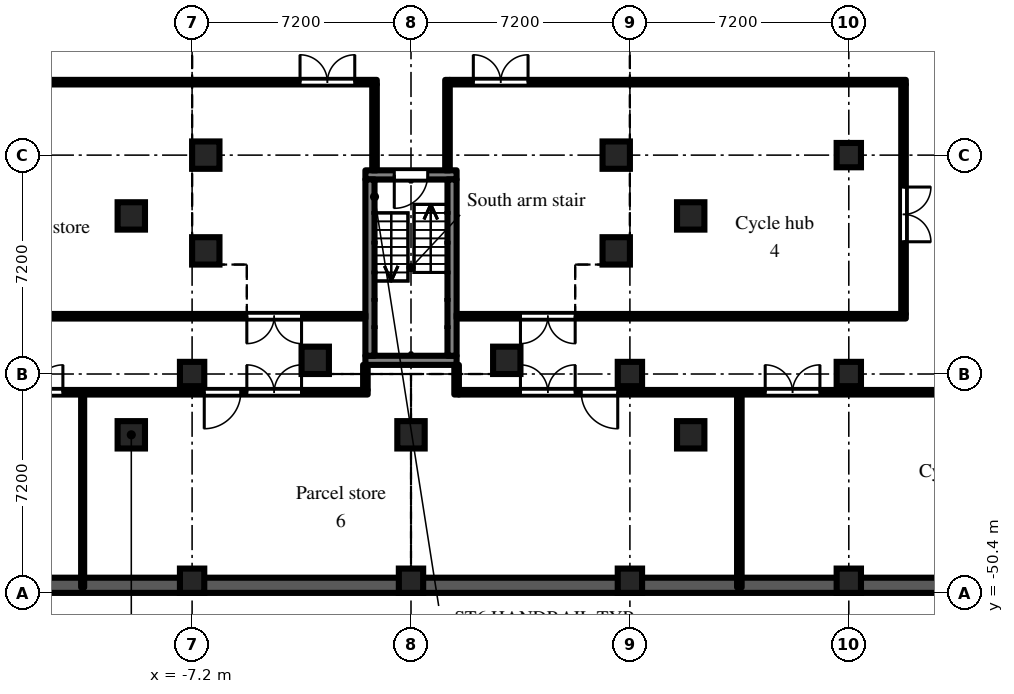
"""IFC4 building model, lengths in metres.
Left out: names, types, materials, properties, quantities, classifications, styles, units other than length and angle.
Written with IfcOpenShell. Run it as: python <this file> out.ifc"""

import sys

from ifc_helpers import new_model, si_unit, direction, frame, frame_2d, origin, origin_2d, place, context, subcontext, project, spatial, rectangle, extrude, element, fill, save


model = new_model("IFC4")
c1 = context("Model", 3, precision=1e-05, world=origin(), true_north=direction((0.0, 1.0)))
c2 = subcontext(c1, "Body", "Model", "MODEL_VIEW")
j1 = project(units=[si_unit("LENGTHUNIT", "METRE"), si_unit("PLANEANGLEUNIT", "RADIAN")], contexts=[c1])
p1 = place(None, origin())
s1 = spatial("IfcSite", under=j1, at=p1, CompositionType="ELEMENT")
p2 = place(p1, origin())
s2 = spatial("IfcBuilding", under=s1, at=p2, CompositionType="ELEMENT")
p3 = place(p2, frame((0.0, 0.0, -4.8)))
s3 = spatial("IfcBuildingStorey", under=s2, at=p3, CompositionType="ELEMENT", Elevation=-4.8)
p4 = place(p3, frame((-50.4, -50.15, -0.5), z_axis=(0.0, 0.0, 1.0), x_axis=(1.0, 0.0, 0.0)))
e1 = element("IfcWall", 1, at=p4, inside=s3, PredefinedType="SOLIDWALL", context=c2, shape_type="SweptSolid", body=[
    extrude(rectangle(XDim=100.8, YDim=0.5, at=frame_2d((50.4, 0.0))), origin(), (0.0, 0.0, 1.0), 5.3),
])
for number, where, z_axis, x_axis in (
    (2, (-6.75, -39.15, -0.5), (0.0, 0.0, 1.0), (1.0, 0.0, 0.0)),
    (3, (-6.75, -36.0, -0.5), (0.0, 0.0, 1.0), (1.0, 0.0, 0.0)),
    (4, (-3.15, -42.75, -0.5), (0.0, 0.0, 1.0), (1.0, 0.0, 0.0)),
    (5, (3.15, -42.75, -0.5), (0.0, 0.0, 1.0), (1.0, 0.0, 0.0)),
    (6, (6.75, -39.15, -0.5), (0.0, 0.0, 1.0), (1.0, 0.0, 0.0)),
    (7, (6.75, -36.0, -0.5), (0.0, 0.0, 1.0), (1.0, 0.0, 0.0)),
):
    element("IfcColumn", number, at=place(p3, frame(where, z_axis=z_axis, x_axis=x_axis)), inside=s3, PredefinedType="COLUMN", context=c2, shape_type="SweptSolid", body=[
        extrude(rectangle(XDim=0.9, YDim=0.9, at=origin_2d()), origin(), (0.0, 0.0, 1.0), 5.3),
    ])
for number, where, z_axis, x_axis in (
    (8, (-7.2, -50.0, -0.5), (0.0, 0.0, 1.0), (1.0, 0.0, 0.0)),
    (9, (-7.2, -43.2, -0.5), (0.0, 0.0, 1.0), (1.0, 0.0, 0.0)),
    (10, (0.0, -50.0, -0.5), (0.0, 0.0, 1.0), (1.0, 0.0, 0.0)),
    (11, (7.2, -50.0, -0.5), (0.0, 0.0, 1.0), (1.0, 0.0, 0.0)),
    (12, (7.2, -43.2, -0.5), (0.0, 0.0, 1.0), (1.0, 0.0, 0.0)),
    (13, (14.4, -50.0, -0.5), (0.0, 0.0, 1.0), (1.0, 0.0, 0.0)),
    (14, (14.4, -43.2, -0.5), (0.0, 0.0, 1.0), (1.0, 0.0, 0.0)),
    (15, (14.4, -36.0, -0.5), (0.0, 0.0, 1.0), (1.0, 0.0, 0.0)),
):
    element("IfcColumn", number, at=place(p3, frame(where, z_axis=z_axis, x_axis=x_axis)), inside=s3, PredefinedType="COLUMN", context=c2, shape_type="SweptSolid", body=[
        extrude(rectangle(XDim=0.8, YDim=0.8, at=origin_2d()), origin(), (0.0, 0.0, 1.0), 5.3),
    ])
for number, where, z_axis, x_axis in (
    (16, (-9.2, -45.2, -0.5), (0.0, 0.0, 1.0), (1.0, 0.0, 0.0)),
    (17, (-9.2, -38.0, -0.5), (0.0, 0.0, 1.0), (1.0, 0.0, 0.0)),
    (18, (0.0, -45.2, -0.5), (0.0, 0.0, 1.0), (1.0, 0.0, 0.0)),
    (19, (9.2, -45.2, -0.5), (0.0, 0.0, 1.0), (1.0, 0.0, 0.0)),
    (20, (9.2, -38.0, -0.5), (0.0, 0.0, 1.0), (1.0, 0.0, 0.0)),
):
    element("IfcColumn", number, at=place(p3, frame(where, z_axis=z_axis, x_axis=x_axis)), inside=s3, PredefinedType="COLUMN", context=c2, shape_type="SweptSolid", body=[
        extrude(rectangle(XDim=0.9, YDim=0.9, at=origin_2d()), origin(), (0.0, 0.0, 1.0), 5.3),
    ])
p5 = place(p3, frame((-1.5, -36.65, 0.0), z_axis=(0.0, 0.0, 1.0), x_axis=(1.0, 0.0, 0.0)))
e21 = element("IfcWall", 21, at=p5, inside=s3, PredefinedType="SHEAR", context=c2, shape_type="SweptSolid", body=[
    extrude(rectangle(XDim=3.0, YDim=0.3, at=frame_2d((1.5, 0.0))), origin(), (0.0, 0.0, 1.0), 4.35),
])
p6 = place(p5, frame((0.95, 0.0, 0.0)))
e22 = element("IfcOpeningElement", 22, at=p6, cuts=e21, PredefinedType="OPENING", context=c2, shape_type="SweptSolid", body=[
    extrude(rectangle(XDim=1.1, YDim=2.1, at=frame_2d((0.55, 1.05))), frame((0.0, 0.16, 0.0), z_axis=(0.0, -1.0, 0.0), x_axis=(1.0, 0.0, 0.0)), (0.0, 0.0, 1.0), 0.32),
])
p7 = place(p3, frame((-1.5, -42.75, 0.0), z_axis=(0.0, 0.0, 1.0), x_axis=(1.0, 0.0, 0.0)))
e23 = element("IfcWall", 23, at=p7, inside=s3, PredefinedType="SHEAR", context=c2, shape_type="SweptSolid", body=[
    extrude(rectangle(XDim=3.0, YDim=0.3, at=frame_2d((1.5, 0.0))), origin(), (0.0, 0.0, 1.0), 4.35),
])
for number, where, z_axis, x_axis in (
    (24, (-1.35, -36.8, 0.0), (0.0, 0.0, 1.0), (0.0, -1.0, 0.0)),
    (25, (1.35, -36.8, 0.0), (0.0, 0.0, 1.0), (0.0, -1.0, 0.0)),
):
    element("IfcWall", number, at=place(p3, frame(where, z_axis=z_axis, x_axis=x_axis)), inside=s3, PredefinedType="SHEAR", context=c2, shape_type="SweptSolid", body=[
        extrude(rectangle(XDim=5.8, YDim=0.3, at=frame_2d((2.9, 0.0))), origin(), (0.0, 0.0, 1.0), 4.35),
    ])
p8 = place(p3, frame((-43.725, -43.8, 0.0), z_axis=(0.0, 0.0, 1.0), x_axis=(1.0, 0.0, 0.0)))
e26 = element("IfcWall", 26, at=p8, inside=s3, PredefinedType="PARTITIONING", context=c2, shape_type="SweptSolid", body=[
    extrude(rectangle(XDim=42.3, YDim=0.15, at=frame_2d((21.15, 0.0))), origin(), (0.0, 0.0, 1.0), 4.35),
])
p9 = place(p8, frame((1.675, 0.0, 0.0)))
e27 = element("IfcOpeningElement", 27, at=p9, cuts=e26, PredefinedType="OPENING", context=c2, shape_type="SweptSolid", body=[
    extrude(rectangle(XDim=1.8, YDim=2.1, at=frame_2d((0.9, 1.05))), frame((0.0, 0.085, 0.0), z_axis=(0.0, -1.0, 0.0), x_axis=(1.0, 0.0, 0.0)), (0.0, 0.0, 1.0), 0.17),
])
p10 = place(p8, frame((4.975, 0.0, 0.0)))
e28 = element("IfcOpeningElement", 28, at=p10, cuts=e26, PredefinedType="OPENING", context=c2, shape_type="SweptSolid", body=[
    extrude(rectangle(XDim=1.8, YDim=2.1, at=frame_2d((0.9, 1.05))), frame((0.0, 0.085, 0.0), z_axis=(0.0, -1.0, 0.0), x_axis=(1.0, 0.0, 0.0)), (0.0, 0.0, 1.0), 0.17),
])
p11 = place(p8, frame((16.075, 0.0, 0.0)))
e29 = element("IfcOpeningElement", 29, at=p11, cuts=e26, PredefinedType="OPENING", context=c2, shape_type="SweptSolid", body=[
    extrude(rectangle(XDim=1.8, YDim=2.1, at=frame_2d((0.9, 1.05))), frame((0.0, 0.085, 0.0), z_axis=(0.0, -1.0, 0.0), x_axis=(1.0, 0.0, 0.0)), (0.0, 0.0, 1.0), 0.17),
])
p12 = place(p8, frame((19.375, 0.0, 0.0)))
e30 = element("IfcOpeningElement", 30, at=p12, cuts=e26, PredefinedType="OPENING", context=c2, shape_type="SweptSolid", body=[
    extrude(rectangle(XDim=1.8, YDim=2.1, at=frame_2d((0.9, 1.05))), frame((0.0, 0.085, 0.0), z_axis=(0.0, -1.0, 0.0), x_axis=(1.0, 0.0, 0.0)), (0.0, 0.0, 1.0), 0.17),
])
p13 = place(p8, frame((30.475, 0.0, 0.0)))
e31 = element("IfcOpeningElement", 31, at=p13, cuts=e26, PredefinedType="OPENING", context=c2, shape_type="SweptSolid", body=[
    extrude(rectangle(XDim=1.8, YDim=2.1, at=frame_2d((0.9, 1.05))), frame((0.0, 0.085, 0.0), z_axis=(0.0, -1.0, 0.0), x_axis=(1.0, 0.0, 0.0)), (0.0, 0.0, 1.0), 0.17),
])
p14 = place(p8, frame((36.925, 0.0, 0.0)))
e32 = element("IfcOpeningElement", 32, at=p14, cuts=e26, PredefinedType="OPENING", context=c2, shape_type="SweptSolid", body=[
    extrude(rectangle(XDim=1.2, YDim=2.1, at=frame_2d((0.6, 1.05))), frame((0.0, 0.085, 0.0), z_axis=(0.0, -1.0, 0.0), x_axis=(1.0, 0.0, 0.0)), (0.0, 0.0, 1.0), 0.17),
])
p15 = place(p8, frame((38.325, 0.0, 0.0)))
e33 = element("IfcOpeningElement", 33, at=p15, cuts=e26, PredefinedType="OPENING", context=c2, shape_type="SweptSolid", body=[
    extrude(rectangle(XDim=1.8, YDim=2.1, at=frame_2d((0.9, 1.05))), frame((0.0, 0.085, 0.0), z_axis=(0.0, -1.0, 0.0), x_axis=(1.0, 0.0, 0.0)), (0.0, 0.0, 1.0), 0.17),
])
p16 = place(p3, frame((-16.125, -41.3, 0.0), z_axis=(0.0, 0.0, 1.0), x_axis=(1.0, 0.0, 0.0)))
e34 = element("IfcWall", 34, at=p16, inside=s3, PredefinedType="PARTITIONING", context=c2, shape_type="SweptSolid", body=[
    extrude(rectangle(XDim=14.625, YDim=0.15, at=frame_2d((7.312, 0.0))), origin(), (0.0, 0.0, 1.0), 4.35),
])
p17 = place(p16, frame((10.725, 0.0, 0.0)))
e35 = element("IfcOpeningElement", 35, at=p17, cuts=e34, PredefinedType="OPENING", context=c2, shape_type="SweptSolid", body=[
    extrude(rectangle(XDim=1.8, YDim=2.1, at=frame_2d((0.9, 1.05))), frame((0.0, 0.085, 0.0), z_axis=(0.0, -1.0, 0.0), x_axis=(1.0, 0.0, 0.0)), (0.0, 0.0, 1.0), 0.17),
])
p18 = place(p3, frame((-16.125, -33.6, 0.0), z_axis=(0.0, 0.0, 1.0), x_axis=(1.0, 0.0, 0.0)))
e36 = element("IfcWall", 36, at=p18, inside=s3, PredefinedType="PARTITIONING", context=c2, shape_type="SweptSolid", body=[
    extrude(rectangle(XDim=15.0, YDim=0.15, at=frame_2d((7.5, 0.0))), origin(), (0.0, 0.0, 1.0), 4.35),
])
p19 = place(p18, frame((12.475, 0.0, 0.0)))
e37 = element("IfcOpeningElement", 37, at=p19, cuts=e36, PredefinedType="OPENING", context=c2, shape_type="SweptSolid", body=[
    extrude(rectangle(XDim=1.8, YDim=2.1, at=frame_2d((0.9, 1.05))), frame((0.0, 0.085, 0.0), z_axis=(0.0, -1.0, 0.0), x_axis=(1.0, 0.0, 0.0)), (0.0, 0.0, 1.0), 0.17),
])
p20 = place(p3, frame((-10.8, -50.22, 0.0), z_axis=(0.0, 0.0, 1.0), x_axis=(0.0, 1.0, 0.0)))
e38 = element("IfcWall", 38, at=p20, inside=s3, PredefinedType="PARTITIONING", context=c2, shape_type="SweptSolid", body=[
    extrude(rectangle(XDim=6.345, YDim=0.1, at=frame_2d((3.172, 0.0))), origin(), (0.0, 0.0, 1.0), 4.35),
])
p21 = place(p3, frame((-1.5, -43.725, 0.0), z_axis=(0.0, 0.0, 1.0), x_axis=(0.0, 1.0, 0.0)))
e39 = element("IfcWall", 39, at=p21, inside=s3, PredefinedType="PARTITIONING", context=c2, shape_type="SweptSolid", body=[
    extrude(rectangle(XDim=0.825, YDim=0.15, at=frame_2d((0.413, 0.0))), origin(), (0.0, 0.0, 1.0), 4.35),
])
p22 = place(p3, frame((-1.2, -36.5, 0.0), z_axis=(0.0, 0.0, 1.0), x_axis=(0.0, 1.0, 0.0)))
e40 = element("IfcWall", 40, at=p22, inside=s3, PredefinedType="PARTITIONING", context=c2, shape_type="SweptSolid", body=[
    extrude(rectangle(XDim=2.825, YDim=0.15, at=frame_2d((1.413, 0.0))), origin(), (0.0, 0.0, 1.0), 4.35),
])
p23 = place(p3, frame((1.2, -36.5, 0.0), z_axis=(0.0, 0.0, 1.0), x_axis=(0.0, 1.0, 0.0)))
e41 = element("IfcWall", 41, at=p23, inside=s3, PredefinedType="PARTITIONING", context=c2, shape_type="SweptSolid", body=[
    extrude(rectangle(XDim=2.975, YDim=0.15, at=frame_2d((1.488, 0.0))), origin(), (0.0, 0.0, 1.0), 4.35),
])
p24 = place(p3, frame((1.275, -33.6, 0.0), z_axis=(0.0, 0.0, 1.0), x_axis=(1.0, 0.0, 0.0)))
e42 = element("IfcWall", 42, at=p24, inside=s3, PredefinedType="PARTITIONING", context=c2, shape_type="SweptSolid", body=[
    extrude(rectangle(XDim=15.0, YDim=0.15, at=frame_2d((7.5, 0.0))), origin(), (0.0, 0.0, 1.0), 4.35),
])
p25 = place(p24, frame((0.775, 0.0, 0.0)))
e43 = element("IfcOpeningElement", 43, at=p25, cuts=e42, PredefinedType="OPENING", context=c2, shape_type="SweptSolid", body=[
    extrude(rectangle(XDim=1.8, YDim=2.1, at=frame_2d((0.9, 1.05))), frame((0.0, 0.085, 0.0), z_axis=(0.0, -1.0, 0.0), x_axis=(1.0, 0.0, 0.0)), (0.0, 0.0, 1.0), 0.17),
])
p26 = place(p3, frame((1.5, -43.875, 0.0), z_axis=(0.0, 0.0, 1.0), x_axis=(0.0, 1.0, 0.0)))
e44 = element("IfcWall", 44, at=p26, inside=s3, PredefinedType="PARTITIONING", context=c2, shape_type="SweptSolid", body=[
    extrude(rectangle(XDim=0.975, YDim=0.15, at=frame_2d((0.488, 0.0))), origin(), (0.0, 0.0, 1.0), 4.35),
])
p27 = place(p3, frame((1.575, -43.8, 0.0), z_axis=(0.0, 0.0, 1.0), x_axis=(1.0, 0.0, 0.0)))
e45 = element("IfcWall", 45, at=p27, inside=s3, PredefinedType="PARTITIONING", context=c2, shape_type="SweptSolid", body=[
    extrude(rectangle(XDim=42.3, YDim=0.15, at=frame_2d((21.15, 0.0))), origin(), (0.0, 0.0, 1.0), 4.35),
])
p28 = place(p27, frame((38.675, 0.0, 0.0)))
e46 = element("IfcOpeningElement", 46, at=p28, cuts=e45, PredefinedType="OPENING", context=c2, shape_type="SweptSolid", body=[
    extrude(rectangle(XDim=1.8, YDim=2.1, at=frame_2d((0.9, 1.05))), frame((0.0, 0.085, 0.0), z_axis=(0.0, -1.0, 0.0), x_axis=(1.0, 0.0, 0.0)), (0.0, 0.0, 1.0), 0.17),
])
p29 = place(p27, frame((2.025, 0.0, 0.0)))
e47 = element("IfcOpeningElement", 47, at=p29, cuts=e45, PredefinedType="OPENING", context=c2, shape_type="SweptSolid", body=[
    extrude(rectangle(XDim=1.8, YDim=2.1, at=frame_2d((0.9, 1.05))), frame((0.0, 0.085, 0.0), z_axis=(0.0, -1.0, 0.0), x_axis=(1.0, 0.0, 0.0)), (0.0, 0.0, 1.0), 0.17),
])
p30 = place(p27, frame((4.025, 0.0, 0.0)))
e48 = element("IfcOpeningElement", 48, at=p30, cuts=e45, PredefinedType="OPENING", context=c2, shape_type="SweptSolid", body=[
    extrude(rectangle(XDim=1.2, YDim=2.1, at=frame_2d((0.6, 1.05))), frame((0.0, 0.085, 0.0), z_axis=(0.0, -1.0, 0.0), x_axis=(1.0, 0.0, 0.0)), (0.0, 0.0, 1.0), 0.17),
])
p31 = place(p27, frame((10.075, 0.0, 0.0)))
e49 = element("IfcOpeningElement", 49, at=p31, cuts=e45, PredefinedType="OPENING", context=c2, shape_type="SweptSolid", body=[
    extrude(rectangle(XDim=1.8, YDim=2.1, at=frame_2d((0.9, 1.05))), frame((0.0, 0.085, 0.0), z_axis=(0.0, -1.0, 0.0), x_axis=(1.0, 0.0, 0.0)), (0.0, 0.0, 1.0), 0.17),
])
p32 = place(p27, frame((21.175, 0.0, 0.0)))
e50 = element("IfcOpeningElement", 50, at=p32, cuts=e45, PredefinedType="OPENING", context=c2, shape_type="SweptSolid", body=[
    extrude(rectangle(XDim=1.8, YDim=2.1, at=frame_2d((0.9, 1.05))), frame((0.0, 0.085, 0.0), z_axis=(0.0, -1.0, 0.0), x_axis=(1.0, 0.0, 0.0)), (0.0, 0.0, 1.0), 0.17),
])
p33 = place(p27, frame((24.475, 0.0, 0.0)))
e51 = element("IfcOpeningElement", 51, at=p33, cuts=e45, PredefinedType="OPENING", context=c2, shape_type="SweptSolid", body=[
    extrude(rectangle(XDim=1.8, YDim=2.1, at=frame_2d((0.9, 1.05))), frame((0.0, 0.085, 0.0), z_axis=(0.0, -1.0, 0.0), x_axis=(1.0, 0.0, 0.0)), (0.0, 0.0, 1.0), 0.17),
])
p34 = place(p27, frame((35.575, 0.0, 0.0)))
e52 = element("IfcOpeningElement", 52, at=p34, cuts=e45, PredefinedType="OPENING", context=c2, shape_type="SweptSolid", body=[
    extrude(rectangle(XDim=1.8, YDim=2.1, at=frame_2d((0.9, 1.05))), frame((0.0, 0.085, 0.0), z_axis=(0.0, -1.0, 0.0), x_axis=(1.0, 0.0, 0.0)), (0.0, 0.0, 1.0), 0.17),
])
p35 = place(p3, frame((1.5, -41.3, 0.0), z_axis=(0.0, 0.0, 1.0), x_axis=(1.0, 0.0, 0.0)))
e53 = element("IfcWall", 53, at=p35, inside=s3, PredefinedType="PARTITIONING", context=c2, shape_type="SweptSolid", body=[
    extrude(rectangle(XDim=14.775, YDim=0.15, at=frame_2d((7.387, 0.0))), origin(), (0.0, 0.0, 1.0), 4.35),
])
p36 = place(p35, frame((2.1, 0.0, 0.0)))
e54 = element("IfcOpeningElement", 54, at=p36, cuts=e53, PredefinedType="OPENING", context=c2, shape_type="SweptSolid", body=[
    extrude(rectangle(XDim=1.8, YDim=2.1, at=frame_2d((0.9, 1.05))), frame((0.0, 0.085, 0.0), z_axis=(0.0, -1.0, 0.0), x_axis=(1.0, 0.0, 0.0)), (0.0, 0.0, 1.0), 0.17),
])
p37 = place(p3, frame((10.8, -50.22, 0.0), z_axis=(0.0, 0.0, 1.0), x_axis=(0.0, 1.0, 0.0)))
e55 = element("IfcWall", 55, at=p37, inside=s3, PredefinedType="PARTITIONING", context=c2, shape_type="SweptSolid", body=[
    extrude(rectangle(XDim=6.345, YDim=0.15, at=frame_2d((3.172, 0.0))), origin(), (0.0, 0.0, 1.0), 4.35),
])
p38 = place(p3, frame((16.2, -41.225, 0.0), z_axis=(0.0, 0.0, 1.0), x_axis=(0.0, 1.0, 0.0)))
e56 = element("IfcWall", 56, at=p38, inside=s3, PredefinedType="PARTITIONING", context=c2, shape_type="SweptSolid", body=[
    extrude(rectangle(XDim=7.55, YDim=0.15, at=frame_2d((3.775, 0.0))), origin(), (0.0, 0.0, 1.0), 4.35),
])
p39 = place(p38, frame((2.375, 0.0, 0.0)))
e57 = element("IfcOpeningElement", 57, at=p39, cuts=e56, PredefinedType="OPENING", context=c2, shape_type="SweptSolid", body=[
    extrude(rectangle(XDim=1.8, YDim=2.1, at=frame_2d((0.9, 1.05))), frame((0.0, 0.085, 0.0), z_axis=(0.0, -1.0, 0.0), x_axis=(1.0, 0.0, 0.0)), (0.0, 0.0, 1.0), 0.17),
])
p40 = place(p6, frame((1.1, 0.0, 0.0), z_axis=(0.0, 0.0, 1.0), x_axis=(-1.0, 0.0, 0.0)))
e58 = element("IfcDoor", 58, at=p40, inside=s3, OperationType="SINGLE_SWING_RIGHT", PredefinedType="DOOR", context=c2, shape_type="SweptSolid", body=[
    extrude(rectangle(XDim=1.1, YDim=2.1, at=frame_2d((0.55, 1.05))), frame((0.0, 0.025, 0.0), z_axis=(0.0, -1.0, 0.0), x_axis=(1.0, 0.0, 0.0)), (0.0, 0.0, 1.0), 0.05),
])
fill(e22, e58)
p41 = place(p17, frame((1.8, 0.0, 0.0), z_axis=(0.0, 0.0, 1.0), x_axis=(-1.0, 0.0, 0.0)))
e59 = element("IfcDoor", 59, at=p41, inside=s3, OperationType="DOUBLE_DOOR_DOUBLE_SWING", PredefinedType="DOOR", context=c2, shape_type="SweptSolid", body=[
    extrude(rectangle(XDim=1.8, YDim=2.1, at=frame_2d((0.9, 1.05))), frame((0.0, 0.025, 0.0), z_axis=(0.0, -1.0, 0.0), x_axis=(1.0, 0.0, 0.0)), (0.0, 0.0, 1.0), 0.05),
])
fill(e35, e59)
p42 = place(p19, origin())
e60 = element("IfcDoor", 60, at=p42, inside=s3, OperationType="DOUBLE_DOOR_DOUBLE_SWING", PredefinedType="DOOR", context=c2, shape_type="SweptSolid", body=[
    extrude(rectangle(XDim=1.8, YDim=2.1, at=frame_2d((0.9, 1.05))), frame((0.0, 0.025, 0.0), z_axis=(0.0, -1.0, 0.0), x_axis=(1.0, 0.0, 0.0)), (0.0, 0.0, 1.0), 0.05),
])
fill(e37, e60)
p43 = place(p25, origin())
e61 = element("IfcDoor", 61, at=p43, inside=s3, OperationType="DOUBLE_DOOR_DOUBLE_SWING", PredefinedType="DOOR", context=c2, shape_type="SweptSolid", body=[
    extrude(rectangle(XDim=1.8, YDim=2.1, at=frame_2d((0.9, 1.05))), frame((0.0, 0.025, 0.0), z_axis=(0.0, -1.0, 0.0), x_axis=(1.0, 0.0, 0.0)), (0.0, 0.0, 1.0), 0.05),
])
fill(e43, e61)
p44 = place(p36, frame((1.8, 0.0, 0.0), z_axis=(0.0, 0.0, 1.0), x_axis=(-1.0, 0.0, 0.0)))
e62 = element("IfcDoor", 62, at=p44, inside=s3, OperationType="DOUBLE_DOOR_DOUBLE_SWING", PredefinedType="DOOR", context=c2, shape_type="SweptSolid", body=[
    extrude(rectangle(XDim=1.8, YDim=2.1, at=frame_2d((0.9, 1.05))), frame((0.0, 0.025, 0.0), z_axis=(0.0, -1.0, 0.0), x_axis=(1.0, 0.0, 0.0)), (0.0, 0.0, 1.0), 0.05),
])
fill(e54, e62)
p45 = place(p39, frame((1.8, 0.0, 0.0), z_axis=(0.0, 0.0, 1.0), x_axis=(-1.0, 0.0, 0.0)))
e63 = element("IfcDoor", 63, at=p45, inside=s3, OperationType="DOUBLE_DOOR_DOUBLE_SWING", PredefinedType="DOOR", context=c2, shape_type="SweptSolid", body=[
    extrude(rectangle(XDim=1.8, YDim=2.1, at=frame_2d((0.9, 1.05))), frame((0.0, 0.025, 0.0), z_axis=(0.0, -1.0, 0.0), x_axis=(1.0, 0.0, 0.0)), (0.0, 0.0, 1.0), 0.05),
])
fill(e57, e63)
p46 = place(p13, origin())
e64 = element("IfcDoor", 64, at=p46, inside=s3, OperationType="DOUBLE_DOOR_DOUBLE_SWING", PredefinedType="DOOR", context=c2, shape_type="SweptSolid", body=[
    extrude(rectangle(XDim=1.8, YDim=2.1, at=frame_2d((0.9, 1.05))), frame((0.0, 0.025, 0.0), z_axis=(0.0, -1.0, 0.0), x_axis=(1.0, 0.0, 0.0)), (0.0, 0.0, 1.0), 0.05),
])
fill(e31, e64)
p47 = place(p14, frame((1.2, 0.0, 0.0), z_axis=(0.0, 0.0, 1.0), x_axis=(-1.0, 0.0, 0.0)))
e65 = element("IfcDoor", 65, at=p47, inside=s3, OperationType="SINGLE_SWING_RIGHT", PredefinedType="DOOR", context=c2, shape_type="SweptSolid", body=[
    extrude(rectangle(XDim=1.2, YDim=2.1, at=frame_2d((0.6, 1.05))), frame((0.0, 0.025, 0.0), z_axis=(0.0, -1.0, 0.0), x_axis=(1.0, 0.0, 0.0)), (0.0, 0.0, 1.0), 0.05),
])
fill(e32, e65)
p48 = place(p15, origin())
e66 = element("IfcDoor", 66, at=p48, inside=s3, OperationType="DOUBLE_DOOR_DOUBLE_SWING", PredefinedType="DOOR", context=c2, shape_type="SweptSolid", body=[
    extrude(rectangle(XDim=1.8, YDim=2.1, at=frame_2d((0.9, 1.05))), frame((0.0, 0.025, 0.0), z_axis=(0.0, -1.0, 0.0), x_axis=(1.0, 0.0, 0.0)), (0.0, 0.0, 1.0), 0.05),
])
fill(e33, e66)
p49 = place(p29, origin())
e67 = element("IfcDoor", 67, at=p49, inside=s3, OperationType="DOUBLE_DOOR_DOUBLE_SWING", PredefinedType="DOOR", context=c2, shape_type="SweptSolid", body=[
    extrude(rectangle(XDim=1.8, YDim=2.1, at=frame_2d((0.9, 1.05))), frame((0.0, 0.025, 0.0), z_axis=(0.0, -1.0, 0.0), x_axis=(1.0, 0.0, 0.0)), (0.0, 0.0, 1.0), 0.05),
])
fill(e47, e67)
p50 = place(p30, frame((1.2, 0.0, 0.0), z_axis=(0.0, 0.0, 1.0), x_axis=(-1.0, 0.0, 0.0)))
e68 = element("IfcDoor", 68, at=p50, inside=s3, OperationType="SINGLE_SWING_LEFT", PredefinedType="DOOR", context=c2, shape_type="SweptSolid", body=[
    extrude(rectangle(XDim=1.2, YDim=2.1, at=frame_2d((0.6, 1.05))), frame((0.0, 0.025, 0.0), z_axis=(0.0, -1.0, 0.0), x_axis=(1.0, 0.0, 0.0)), (0.0, 0.0, 1.0), 0.05),
])
fill(e48, e68)
p51 = place(p31, origin())
e69 = element("IfcDoor", 69, at=p51, inside=s3, OperationType="DOUBLE_DOOR_DOUBLE_SWING", PredefinedType="DOOR", context=c2, shape_type="SweptSolid", body=[
    extrude(rectangle(XDim=1.8, YDim=2.1, at=frame_2d((0.9, 1.05))), frame((0.0, 0.025, 0.0), z_axis=(0.0, -1.0, 0.0), x_axis=(1.0, 0.0, 0.0)), (0.0, 0.0, 1.0), 0.05),
])
fill(e49, e69)
save(model, sys.argv[1])
